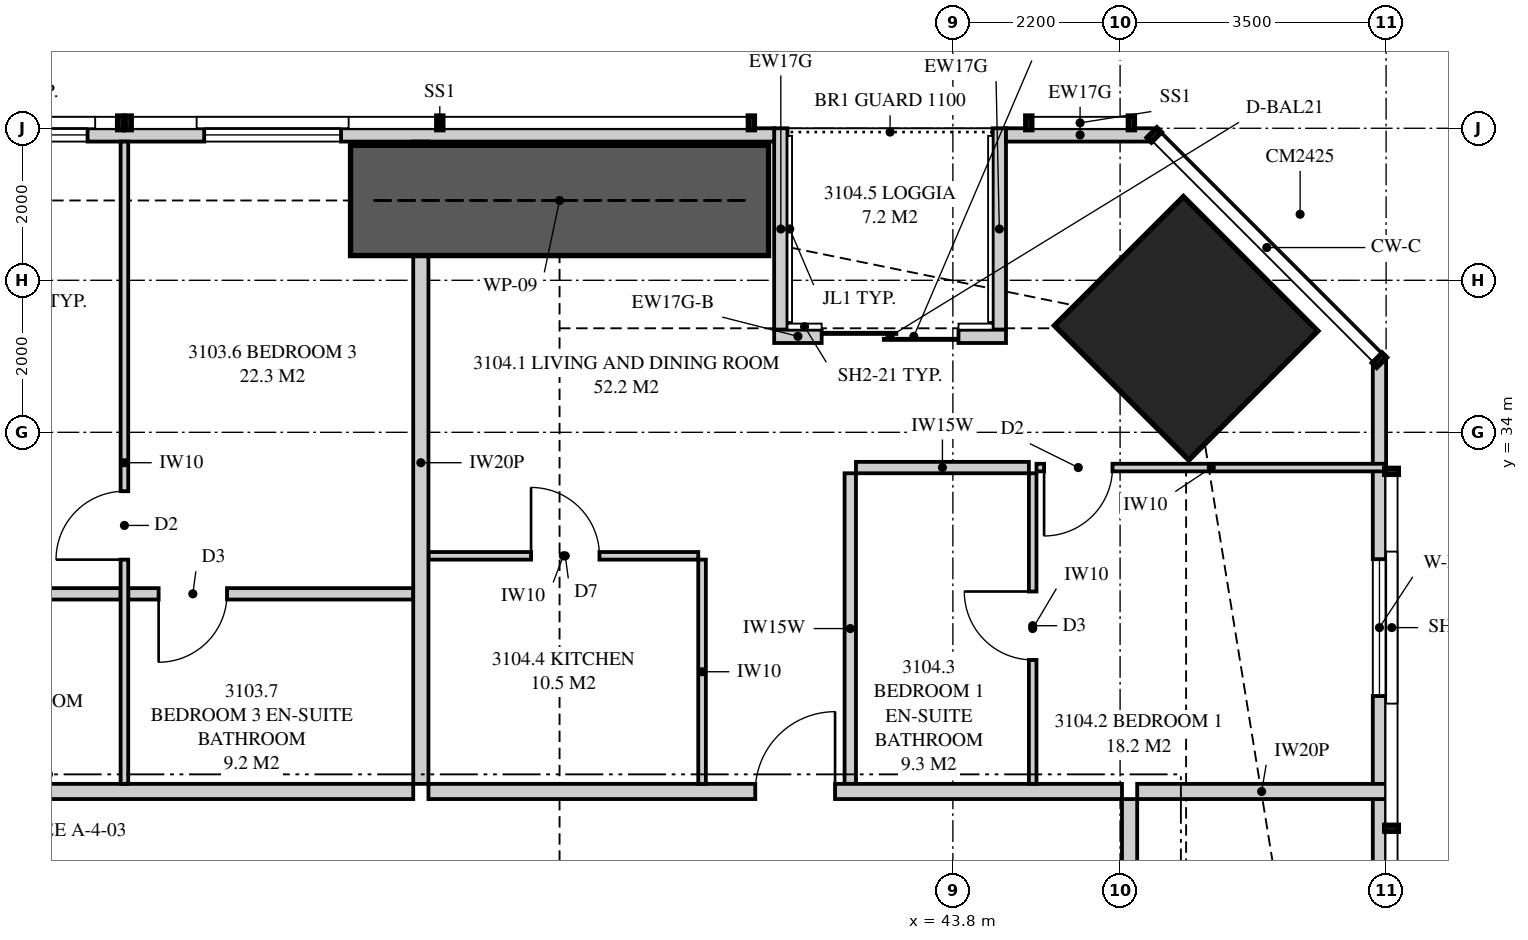
"""IFC4 building model, lengths in metres.
Left out: names, types, materials, properties, quantities, classifications, styles, units other than length and angle.
Written with IfcOpenShell. Run it as: python <this file> out.ifc"""

import sys

from ifc_helpers import new_model, si_unit, direction, frame, frame_2d, origin, origin_2d, place, context, subcontext, project, spatial, polyline, rectangle, outline, extrude, element, fill, save


model = new_model("IFC4")
c1 = context("Model", 3, precision=1e-05, world=origin(), true_north=direction((0.0, 1.0)))
c2 = subcontext(c1, "Body", "Model", "MODEL_VIEW")
j1 = project(units=[si_unit("LENGTHUNIT", "METRE"), si_unit("PLANEANGLEUNIT", "RADIAN")], contexts=[c1])
p1 = place(None, origin())
s1 = spatial("IfcSite", under=j1, at=p1, CompositionType="ELEMENT")
p2 = place(p1, origin())
s2 = spatial("IfcBuilding", under=s1, at=p2, CompositionType="ELEMENT")
p3 = place(p2, frame((0.0, 0.0, 114.9)))
s3 = spatial("IfcBuildingStorey", under=s2, at=p3, CompositionType="ELEMENT", Elevation=114.9)
p4 = place(p3, frame((46.869, 35.369, 0.0), z_axis=(0.0, 0.0, 1.0), x_axis=(-0.707106781187, -0.707106781187, 0.0)))
e1 = element("IfcColumn", 1, at=p4, inside=s3, PredefinedType="COLUMN", context=c2, shape_type="SweptSolid", body=[
    extrude(rectangle(XDim=2.4, YDim=2.5, at=origin_2d()), origin(), (0.0, 0.0, 1.0), 3.35),
])
p5 = place(p3, frame((49.413, 3.051, 0.0), z_axis=(0.0, 0.0, 1.0), x_axis=(0.0, 1.0, 0.0)))
e2 = element("IfcWall", 2, at=p5, inside=s3, PredefinedType="SOLIDWALL", context=c2, shape_type="SweptSolid", body=[
    extrude(outline(polyline([(0.0, 0.0), (31.897, 0.0), (31.897, 3.11), (22.167, 3.11), (22.167, 2.15), (22.074, 2.15), (22.074, 3.11), (21.949, 3.11), (21.949, 2.15), (9.949, 2.15), (9.949, 3.11), (9.823, 3.11), (9.823, 2.15), (9.73, 2.15), (9.73, 3.11), (0.0, 3.11), (0.0, 0.0)])), frame((0.0, 0.087, 0.0), z_axis=(0.0, -1.0, 0.0), x_axis=(1.0, 0.0, 0.0)), (0.0, 0.0, 1.0), 0.175),
])
p6 = place(p5, frame((2.118, 0.0, 0.4)))
e3 = element("IfcOpeningElement", 3, at=p6, cuts=e2, PredefinedType="OPENING", context=c2, shape_type="SweptSolid", body=[
    extrude(rectangle(XDim=1.8, YDim=1.7, at=frame_2d((0.9, 0.85))), frame((0.0, 0.097, 0.0), z_axis=(0.0, -1.0, 0.0), x_axis=(1.0, 0.0, 0.0)), (0.0, 0.0, 1.0), 0.195),
])
p7 = place(p5, frame((14.849, 0.0, 0.4)))
e4 = element("IfcOpeningElement", 4, at=p7, cuts=e2, PredefinedType="OPENING", context=c2, shape_type="SweptSolid", body=[
    extrude(rectangle(XDim=1.2, YDim=1.7, at=frame_2d((0.6, 0.85))), frame((0.0, 0.097, 0.0), z_axis=(0.0, -1.0, 0.0), x_axis=(1.0, 0.0, 0.0)), (0.0, 0.0, 1.0), 0.195),
])
p8 = place(p5, frame((27.479, 0.0, 0.4)))
e5 = element("IfcOpeningElement", 5, at=p8, cuts=e2, PredefinedType="OPENING", context=c2, shape_type="SweptSolid", body=[
    extrude(rectangle(XDim=1.8, YDim=1.7, at=frame_2d((0.9, 0.85))), frame((0.0, 0.097, 0.0), z_axis=(0.0, -1.0, 0.0), x_axis=(1.0, 0.0, 0.0)), (0.0, 0.0, 1.0), 0.195),
])
p9 = place(p3, frame((46.449, 37.913, 0.0), z_axis=(0.0, 0.0, 1.0), x_axis=(-1.0, 0.0, 0.0)))
e6 = element("IfcWall", 6, at=p9, inside=s3, PredefinedType="SOLIDWALL", context=c2, shape_type="SweptSolid", body=[
    extrude(rectangle(XDim=1.95, YDim=0.175, at=frame_2d((0.975, 0.0))), origin(), (0.0, 0.0, 1.0), 3.11),
])
p10 = place(p3, frame((41.449, 37.913, 0.0), z_axis=(0.0, 0.0, 1.0), x_axis=(-1.0, 0.0, 0.0)))
e7 = element("IfcWall", 7, at=p10, inside=s3, PredefinedType="SOLIDWALL", context=c2, shape_type="SweptSolid", body=[
    extrude(outline(polyline([(0.0, 0.0), (27.374, 0.0), (27.374, 3.11), (24.777, 3.11), (24.777, 2.15), (24.732, 2.15), (24.732, 3.11), (24.574, 3.11), (24.574, 2.15), (2.824, 2.15), (2.824, 3.11), (2.666, 3.11), (2.666, 2.15), (2.62, 2.15), (2.62, 3.11), (0.0, 3.11), (0.0, 0.0)])), frame((0.0, 0.087, 0.0), z_axis=(0.0, -1.0, 0.0), x_axis=(1.0, 0.0, 0.0)), (0.0, 0.0, 1.0), 0.175),
])
p11 = place(p10, frame((5.699, 0.0, 0.4)))
e8 = element("IfcOpeningElement", 8, at=p11, cuts=e7, PredefinedType="OPENING", context=c2, shape_type="SweptSolid", body=[
    extrude(rectangle(XDim=1.8, YDim=1.7, at=frame_2d((0.9, 0.85))), frame((0.0, 0.097, 0.0), z_axis=(0.0, -1.0, 0.0), x_axis=(1.0, 0.0, 0.0)), (0.0, 0.0, 1.0), 0.195),
])
p12 = place(p10, frame((9.034, 0.0, 0.4)))
e9 = element("IfcOpeningElement", 9, at=p12, cuts=e7, PredefinedType="OPENING", context=c2, shape_type="SweptSolid", body=[
    extrude(rectangle(XDim=1.8, YDim=1.7, at=frame_2d((0.9, 0.85))), frame((0.0, 0.097, 0.0), z_axis=(0.0, -1.0, 0.0), x_axis=(1.0, 0.0, 0.0)), (0.0, 0.0, 1.0), 0.195),
])
p13 = place(p10, frame((16.558, 0.0, 0.4)))
e10 = element("IfcOpeningElement", 10, at=p13, cuts=e7, PredefinedType="OPENING", context=c2, shape_type="SweptSolid", body=[
    extrude(rectangle(XDim=1.8, YDim=1.7, at=frame_2d((0.9, 0.85))), frame((0.0, 0.097, 0.0), z_axis=(0.0, -1.0, 0.0), x_axis=(1.0, 0.0, 0.0)), (0.0, 0.0, 1.0), 0.195),
])
p14 = place(p10, frame((19.724, 0.0, 0.4)))
e11 = element("IfcOpeningElement", 11, at=p14, cuts=e7, PredefinedType="OPENING", context=c2, shape_type="SweptSolid", body=[
    extrude(rectangle(XDim=1.8, YDim=1.7, at=frame_2d((0.9, 0.85))), frame((0.0, 0.097, 0.0), z_axis=(0.0, -1.0, 0.0), x_axis=(1.0, 0.0, 0.0)), (0.0, 0.0, 1.0), 0.195),
])
p15 = place(p3, frame((44.499, 35.262, 0.0), z_axis=(0.0, 0.0, 1.0), x_axis=(-1.0, 0.0, 0.0)))
e12 = element("IfcWall", 12, at=p15, inside=s3, PredefinedType="SOLIDWALL", context=c2, shape_type="SweptSolid", body=[
    extrude(rectangle(XDim=2.425, YDim=0.175, at=frame_2d((1.212, 0.0))), origin(), (0.0, 0.0, 1.0), 2.15),
])
p16 = place(p15, frame((0.625, 0.0, 0.0)))
e13 = element("IfcOpeningElement", 13, at=p16, cuts=e12, PredefinedType="OPENING", context=c2, shape_type="SweptSolid", body=[
    extrude(rectangle(XDim=1.8, YDim=2.1, at=frame_2d((0.9, 1.05))), frame((0.0, 0.097, 0.0), z_axis=(0.0, -1.0, 0.0), x_axis=(1.0, 0.0, 0.0)), (0.0, 0.0, 1.0), 0.195),
])
p17 = place(p3, frame((42.074, 35.262, 0.0), z_axis=(0.0, 0.0, 1.0), x_axis=(-1.0, 0.0, 0.0)))
e14 = element("IfcWall", 14, at=p17, inside=s3, PredefinedType="SOLIDWALL", context=c2, shape_type="SweptSolid", body=[
    extrude(rectangle(XDim=0.625, YDim=0.175, at=frame_2d((0.312, 0.0))), origin(), (0.0, 0.0, 1.0), 2.51),
])
p18 = place(p3, frame((44.411, 38.0, 0.0), z_axis=(0.0, 0.0, 1.0), x_axis=(0.0, -1.0, 0.0)))
e15 = element("IfcWall", 15, at=p18, inside=s3, PredefinedType="SOLIDWALL", context=c2, shape_type="SweptSolid", body=[
    extrude(outline(polyline([(0.0, 0.0), (2.65, 0.0), (2.65, 2.15), (1.296, 2.15), (1.296, 3.11), (0.0, 3.11), (0.0, 0.0)])), frame((0.0, 0.087, 0.0), z_axis=(0.0, -1.0, 0.0), x_axis=(1.0, 0.0, 0.0)), (0.0, 0.0, 1.0), 0.175),
])
p19 = place(p3, frame((41.536, 38.0, 0.0), z_axis=(0.0, 0.0, 1.0), x_axis=(0.0, -1.0, 0.0)))
e16 = element("IfcWall", 16, at=p19, inside=s3, PredefinedType="SOLIDWALL", context=c2, shape_type="SweptSolid", body=[
    extrude(outline(polyline([(0.0, 0.0), (2.65, 0.0), (2.65, 2.51), (2.378, 2.51), (2.378, 2.15), (0.709, 2.15), (0.709, 3.11), (0.0, 3.11), (0.0, 0.0)])), frame((0.0, 0.087, 0.0), z_axis=(0.0, -1.0, 0.0), x_axis=(1.0, 0.0, 0.0)), (0.0, 0.0, 1.0), 0.175),
])
p20 = place(p3, frame((36.8, 37.825, 0.0), z_axis=(0.0, 0.0, 1.0), x_axis=(0.0, -1.0, 0.0)))
e17 = element("IfcWall", 17, at=p20, inside=s3, PredefinedType="PARTITIONING", context=c2, shape_type="SweptSolid", body=[
    extrude(outline(polyline([(0.529, 2.15), (0.0, 2.15), (0.0, 0.0), (0.529, 0.0), (0.529, 0.257), (1.021, 0.257), (1.021, 0.0), (8.45, 0.0), (8.45, 3.11), (1.685, 3.11), (1.685, 2.15), (1.021, 2.15), (1.021, 1.894), (0.529, 1.894), (0.529, 2.15)])), frame((0.0, 0.1, 0.0), z_axis=(0.0, -1.0, 0.0), x_axis=(1.0, 0.0, 0.0)), (0.0, 0.0, 1.0), 0.2),
])
p21 = place(p3, frame((17.775, 29.275, 0.0), z_axis=(0.0, 0.0, 1.0), x_axis=(1.0, 0.0, 0.0)))
e18 = element("IfcWall", 18, at=p21, inside=s3, PredefinedType="PARTITIONING", context=c2, shape_type="SweptSolid", body=[
    extrude(outline(polyline([(0.0, 0.0), (18.925, 0.0), (18.925, 3.11), (10.312, 3.11), (10.312, 2.541), (9.638, 2.541), (9.638, 3.11), (0.0, 3.11), (0.0, 0.0)])), frame((0.0, 0.1, 0.0), z_axis=(0.0, -1.0, 0.0), x_axis=(1.0, 0.0, 0.0)), (0.0, 0.0, 1.0), 0.2),
])
p22 = place(p21, frame((3.125, 0.0, 0.0)))
e19 = element("IfcOpeningElement", 19, at=p22, cuts=e18, PredefinedType="OPENING", context=c2, shape_type="SweptSolid", body=[
    extrude(rectangle(XDim=1.05, YDim=2.2, at=frame_2d((0.525, 1.1))), frame((0.0, 0.11, 0.0), z_axis=(0.0, -1.0, 0.0), x_axis=(1.0, 0.0, 0.0)), (0.0, 0.0, 1.0), 0.22),
])
p23 = place(p3, frame((32.9, 37.825, 0.0), z_axis=(0.0, 0.0, 1.0), x_axis=(0.0, -1.0, 0.0)))
e20 = element("IfcWall", 20, at=p23, inside=s3, PredefinedType="PARTITIONING", context=c2, shape_type="SweptSolid", body=[
    extrude(outline(polyline([(0.0, 0.0), (8.45, 0.0), (8.45, 3.11), (1.635, 3.11), (1.635, 2.15), (0.0, 2.15), (0.0, 3.11), (0.0, 0.0)])), frame((0.0, 0.05, 0.0), z_axis=(0.0, -1.0, 0.0), x_axis=(1.0, 0.0, 0.0)), (0.0, 0.0, 1.0), 0.1),
])
p24 = place(p23, frame((4.6, 0.0, 0.0)))
e21 = element("IfcOpeningElement", 21, at=p24, cuts=e20, PredefinedType="OPENING", context=c2, shape_type="SweptSolid", body=[
    extrude(rectangle(XDim=0.9, YDim=2.1, at=frame_2d((0.45, 1.05))), frame((0.0, 0.06, 0.0), z_axis=(0.0, -1.0, 0.0), x_axis=(1.0, 0.0, 0.0)), (0.0, 0.0, 1.0), 0.12),
])
p25 = place(p3, frame((26.95, 31.875, 0.0), z_axis=(0.0, 0.0, 1.0), x_axis=(1.0, 0.0, 0.0)))
e22 = element("IfcWall", 22, at=p25, inside=s3, PredefinedType="PLUMBINGWALL", context=c2, shape_type="SweptSolid", body=[
    extrude(outline(polyline([(0.0, 0.0), (5.9, 0.0), (5.9, 3.11), (1.112, 3.11), (1.112, 2.541), (0.488, 2.541), (0.488, 3.11), (0.0, 3.11), (0.0, 0.0)])), frame((0.0, 0.075, 0.0), z_axis=(0.0, -1.0, 0.0), x_axis=(1.0, 0.0, 0.0)), (0.0, 0.0, 1.0), 0.15),
])
p26 = place(p25, frame((0.4, 0.0, 0.0)))
e23 = element("IfcOpeningElement", 23, at=p26, cuts=e22, PredefinedType="OPENING", context=c2, shape_type="SweptSolid", body=[
    extrude(rectangle(XDim=0.9, YDim=2.1, at=frame_2d((0.45, 1.05))), frame((0.0, 0.085, 0.0), z_axis=(0.0, -1.0, 0.0), x_axis=(1.0, 0.0, 0.0)), (0.0, 0.0, 1.0), 0.17),
])
p27 = place(p3, frame((32.95, 31.875, 0.0), z_axis=(0.0, 0.0, 1.0), x_axis=(1.0, 0.0, 0.0)))
e24 = element("IfcWall", 24, at=p27, inside=s3, PredefinedType="PLUMBINGWALL", context=c2, shape_type="SweptSolid", body=[
    extrude(rectangle(XDim=3.75, YDim=0.15, at=frame_2d((1.875, 0.0))), origin(), (0.0, 0.0, 1.0), 3.11),
])
p28 = place(p27, frame((0.4, 0.0, 0.0)))
e25 = element("IfcOpeningElement", 25, at=p28, cuts=e24, PredefinedType="OPENING", context=c2, shape_type="SweptSolid", body=[
    extrude(rectangle(XDim=0.9, YDim=2.1, at=frame_2d((0.45, 1.05))), frame((0.0, 0.085, 0.0), z_axis=(0.0, -1.0, 0.0), x_axis=(1.0, 0.0, 0.0)), (0.0, 0.0, 1.0), 0.17),
])
p29 = place(p3, frame((36.9, 29.275, 0.0), z_axis=(0.0, 0.0, 1.0), x_axis=(1.0, 0.0, 0.0)))
e26 = element("IfcWall", 26, at=p29, inside=s3, PredefinedType="PARTITIONING", context=c2, shape_type="SweptSolid", body=[
    extrude(outline(polyline([(0.0, 0.0), (9.125, 0.0), (9.125, 3.11), (2.062, 3.11), (2.062, 2.541), (1.388, 2.541), (1.388, 3.11), (0.0, 3.11), (0.0, 0.0)])), frame((0.0, 0.1, 0.0), z_axis=(0.0, -1.0, 0.0), x_axis=(1.0, 0.0, 0.0)), (0.0, 0.0, 1.0), 0.2),
])
p30 = place(p29, frame((4.3, 0.0, 0.0)))
e27 = element("IfcOpeningElement", 27, at=p30, cuts=e26, PredefinedType="OPENING", context=c2, shape_type="SweptSolid", body=[
    extrude(rectangle(XDim=1.05, YDim=2.2, at=frame_2d((0.525, 1.1))), frame((0.0, 0.11, 0.0), z_axis=(0.0, -1.0, 0.0), x_axis=(1.0, 0.0, 0.0)), (0.0, 0.0, 1.0), 0.22),
])
p31 = place(p3, frame((44.85, 33.461, 0.0), z_axis=(0.0, 0.0, 1.0), x_axis=(0.0, -1.0, 0.0)))
e28 = element("IfcWall", 28, at=p31, inside=s3, PredefinedType="PARTITIONING", context=c2, shape_type="SweptSolid", body=[
    extrude(rectangle(XDim=4.086, YDim=0.1, at=frame_2d((2.043, 0.0))), origin(), (0.0, 0.0, 1.0), 3.11),
])
p32 = place(p31, frame((1.556, 0.0, 0.0)))
e29 = element("IfcOpeningElement", 29, at=p32, cuts=e28, PredefinedType="OPENING", context=c2, shape_type="SweptSolid", body=[
    extrude(rectangle(XDim=0.9, YDim=2.1, at=frame_2d((0.45, 1.05))), frame((0.0, 0.06, 0.0), z_axis=(0.0, -1.0, 0.0), x_axis=(1.0, 0.0, 0.0)), (0.0, 0.0, 1.0), 0.12),
])
p33 = place(p3, frame((44.9, 33.536, 0.0), z_axis=(0.0, 0.0, 1.0), x_axis=(1.0, 0.0, 0.0)))
e30 = element("IfcWall", 30, at=p33, inside=s3, PredefinedType="PARTITIONING", context=c2, shape_type="SweptSolid", body=[
    extrude(outline(polyline([(0.0, 0.0), (4.6, 0.0), (4.6, 3.11), (3.137, 3.11), (3.137, 2.15), (1.395, 2.15), (1.395, 3.11), (0.0, 3.11), (0.0, 0.0)])), frame((0.0, 0.05, 0.0), z_axis=(0.0, -1.0, 0.0), x_axis=(1.0, 0.0, 0.0)), (0.0, 0.0, 1.0), 0.1),
])
p34 = place(p33, frame((0.1, 0.0, 0.0)))
e31 = element("IfcOpeningElement", 31, at=p34, cuts=e30, PredefinedType="OPENING", context=c2, shape_type="SweptSolid", body=[
    extrude(rectangle(XDim=0.9, YDim=2.1, at=frame_2d((0.45, 1.05))), frame((0.0, 0.06, 0.0), z_axis=(0.0, -1.0, 0.0), x_axis=(1.0, 0.0, 0.0)), (0.0, 0.0, 1.0), 0.12),
])
p35 = place(p3, frame((42.525, 33.536, 0.0), z_axis=(0.0, 0.0, 1.0), x_axis=(1.0, 0.0, 0.0)))
e32 = element("IfcWall", 32, at=p35, inside=s3, PredefinedType="PLUMBINGWALL", context=c2, shape_type="SweptSolid", body=[
    extrude(rectangle(XDim=2.275, YDim=0.15, at=frame_2d((1.138, 0.0))), origin(), (0.0, 0.0, 1.0), 3.11),
])
p36 = place(p3, frame((42.45, 33.461, 0.0), z_axis=(0.0, 0.0, 1.0), x_axis=(0.0, -1.0, 0.0)))
e33 = element("IfcWall", 33, at=p36, inside=s3, PredefinedType="PLUMBINGWALL", context=c2, shape_type="SweptSolid", body=[
    extrude(rectangle(XDim=4.086, YDim=0.15, at=frame_2d((2.043, 0.0))), origin(), (0.0, 0.0, 1.0), 3.11),
])
p37 = place(p3, frame((36.9, 32.375, 0.0), z_axis=(0.0, 0.0, 1.0), x_axis=(1.0, 0.0, 0.0)))
e34 = element("IfcWall", 34, at=p37, inside=s3, PredefinedType="PARTITIONING", context=c2, shape_type="SweptSolid", body=[
    extrude(outline(polyline([(0.0, 0.0), (3.55, 0.0), (3.55, 3.11), (2.012, 3.11), (2.012, 2.541), (1.438, 2.541), (1.438, 3.11), (0.0, 3.11), (0.0, 0.0)])), frame((0.0, 0.05, 0.0), z_axis=(0.0, -1.0, 0.0), x_axis=(1.0, 0.0, 0.0)), (0.0, 0.0, 1.0), 0.1),
])
p38 = place(p37, frame((1.35, 0.0, 0.0)))
e35 = element("IfcOpeningElement", 35, at=p38, cuts=e34, PredefinedType="OPENING", context=c2, shape_type="SweptSolid", body=[
    extrude(rectangle(XDim=0.9, YDim=2.1, at=frame_2d((0.45, 1.05))), frame((0.0, 0.06, 0.0), z_axis=(0.0, -1.0, 0.0), x_axis=(1.0, 0.0, 0.0)), (0.0, 0.0, 1.0), 0.12),
])
p39 = place(p3, frame((40.5, 32.325, 0.0), z_axis=(0.0, 0.0, 1.0), x_axis=(0.0, -1.0, 0.0)))
e36 = element("IfcWall", 36, at=p39, inside=s3, PredefinedType="PARTITIONING", context=c2, shape_type="SweptSolid", body=[
    extrude(rectangle(XDim=2.95, YDim=0.1, at=frame_2d((1.475, 0.0))), origin(), (0.0, 0.0, 1.0), 3.11),
])
p40 = place(p3, frame((46.225, 29.275, 0.0), z_axis=(0.0, 0.0, 1.0), x_axis=(1.0, 0.0, 0.0)))
e37 = element("IfcWall", 37, at=p40, inside=s3, PredefinedType="PARTITIONING", context=c2, shape_type="SweptSolid", body=[
    extrude(outline(polyline([(0.0, 0.0), (3.275, 0.0), (3.275, 3.11), (2.554, 3.11), (2.554, 2.15), (0.805, 2.15), (0.805, 2.541), (0.306, 2.541), (0.306, 3.11), (0.0, 3.11), (0.0, 0.0)])), frame((0.0, 0.1, 0.0), z_axis=(0.0, -1.0, 0.0), x_axis=(1.0, 0.0, 0.0)), (0.0, 0.0, 1.0), 0.2),
])
p41 = place(p3, frame((46.125, 20.7, 0.0), z_axis=(0.0, 0.0, 1.0), x_axis=(0.0, 1.0, 0.0)))
e38 = element("IfcWall", 38, at=p41, inside=s3, PredefinedType="PARTITIONING", context=c2, shape_type="SweptSolid", body=[
    extrude(outline(polyline([(0.0, 0.0), (8.475, 0.0), (8.475, 3.11), (4.637, 3.11), (4.637, 2.541), (3.963, 2.541), (3.963, 3.11), (0.0, 3.11), (0.0, 0.0)])), frame((0.0, 0.1, 0.0), z_axis=(0.0, -1.0, 0.0), x_axis=(1.0, 0.0, 0.0)), (0.0, 0.0, 1.0), 0.2),
])
p42 = place(p41, frame((6.625, 0.0, 0.0)))
e39 = element("IfcOpeningElement", 39, at=p42, cuts=e38, PredefinedType="OPENING", context=c2, shape_type="SweptSolid", body=[
    extrude(rectangle(XDim=1.0, YDim=2.1, at=frame_2d((0.5, 1.05))), frame((0.0, 0.11, 0.0), z_axis=(0.0, -1.0, 0.0), x_axis=(1.0, 0.0, 0.0)), (0.0, 0.0, 1.0), 0.22),
])
p43 = place(p3, frame((35.875, 37.05, 0.0), z_axis=(0.0, 0.0, 1.0), x_axis=(1.0, 0.0, 0.0)))
e40 = element("IfcWall", 40, at=p43, inside=s3, PredefinedType="SHEAR", context=c2, shape_type="SweptSolid", body=[
    extrude(rectangle(XDim=5.5, YDim=1.45, at=frame_2d((2.75, 0.0))), origin(), (0.0, 0.0, 1.0), 3.35),
])
p44 = place(p8, origin())
e41 = element("IfcWindow", 41, at=p44, inside=s3, PartitioningType="SINGLE_PANEL", PredefinedType="WINDOW", context=c2, shape_type="SweptSolid", body=[
    extrude(rectangle(XDim=1.8, YDim=1.7, at=frame_2d((0.9, 0.85))), frame((0.0, 0.03, 0.0), z_axis=(0.0, -1.0, 0.0), x_axis=(1.0, 0.0, 0.0)), (0.0, 0.0, 1.0), 0.06),
])
fill(e5, e41)
p45 = place(p16, origin())
e42 = element("IfcDoor", 42, at=p45, inside=s3, OperationType="SLIDING_TO_LEFT", PredefinedType="DOOR", context=c2, shape_type="SweptSolid", body=[
    extrude(rectangle(XDim=1.8, YDim=2.1, at=frame_2d((0.9, 1.05))), frame((0.0, 0.025, 0.0), z_axis=(0.0, -1.0, 0.0), x_axis=(1.0, 0.0, 0.0)), (0.0, 0.0, 1.0), 0.05),
])
fill(e13, e42)
p46 = place(p11, origin())
e43 = element("IfcWindow", 43, at=p46, inside=s3, PartitioningType="SINGLE_PANEL", PredefinedType="WINDOW", context=c2, shape_type="SweptSolid", body=[
    extrude(rectangle(XDim=1.8, YDim=1.7, at=frame_2d((0.9, 0.85))), frame((0.0, 0.03, 0.0), z_axis=(0.0, -1.0, 0.0), x_axis=(1.0, 0.0, 0.0)), (0.0, 0.0, 1.0), 0.06),
])
fill(e8, e43)
p47 = place(p12, origin())
e44 = element("IfcWindow", 44, at=p47, inside=s3, PartitioningType="SINGLE_PANEL", PredefinedType="WINDOW", context=c2, shape_type="SweptSolid", body=[
    extrude(rectangle(XDim=1.8, YDim=1.7, at=frame_2d((0.9, 0.85))), frame((0.0, 0.03, 0.0), z_axis=(0.0, -1.0, 0.0), x_axis=(1.0, 0.0, 0.0)), (0.0, 0.0, 1.0), 0.06),
])
fill(e9, e44)
p48 = place(p24, frame((0.9, 0.0, 0.0), z_axis=(0.0, 0.0, 1.0), x_axis=(-1.0, 0.0, 0.0)))
e45 = element("IfcDoor", 45, at=p48, inside=s3, OperationType="SINGLE_SWING_LEFT", PredefinedType="DOOR", context=c2, shape_type="SweptSolid", body=[
    extrude(rectangle(XDim=0.9, YDim=2.1, at=frame_2d((0.45, 1.05))), frame((0.0, 0.025, 0.0), z_axis=(0.0, -1.0, 0.0), x_axis=(1.0, 0.0, 0.0)), (0.0, 0.0, 1.0), 0.05),
])
fill(e21, e45)
p49 = place(p28, frame((0.9, 0.0, 0.0), z_axis=(0.0, 0.0, 1.0), x_axis=(-1.0, 0.0, 0.0)))
e46 = element("IfcDoor", 46, at=p49, inside=s3, OperationType="SINGLE_SWING_RIGHT", PredefinedType="DOOR", context=c2, shape_type="SweptSolid", body=[
    extrude(rectangle(XDim=0.9, YDim=2.1, at=frame_2d((0.45, 1.05))), frame((0.0, 0.025, 0.0), z_axis=(0.0, -1.0, 0.0), x_axis=(1.0, 0.0, 0.0)), (0.0, 0.0, 1.0), 0.05),
])
fill(e25, e46)
p50 = place(p30, origin())
e47 = element("IfcDoor", 47, at=p50, inside=s3, OperationType="SINGLE_SWING_RIGHT", PredefinedType="DOOR", context=c2, shape_type="SweptSolid", body=[
    extrude(rectangle(XDim=1.05, YDim=2.2, at=frame_2d((0.525, 1.1))), frame((0.0, 0.025, 0.0), z_axis=(0.0, -1.0, 0.0), x_axis=(1.0, 0.0, 0.0)), (0.0, 0.0, 1.0), 0.05),
])
fill(e27, e47)
p51 = place(p34, frame((0.9, 0.0, 0.0), z_axis=(0.0, 0.0, 1.0), x_axis=(-1.0, 0.0, 0.0)))
e48 = element("IfcDoor", 48, at=p51, inside=s3, OperationType="SINGLE_SWING_RIGHT", PredefinedType="DOOR", context=c2, shape_type="SweptSolid", body=[
    extrude(rectangle(XDim=0.9, YDim=2.1, at=frame_2d((0.45, 1.05))), frame((0.0, 0.025, 0.0), z_axis=(0.0, -1.0, 0.0), x_axis=(1.0, 0.0, 0.0)), (0.0, 0.0, 1.0), 0.05),
])
fill(e31, e48)
p52 = place(p32, frame((0.9, 0.0, 0.0), z_axis=(0.0, 0.0, 1.0), x_axis=(-1.0, 0.0, 0.0)))
e49 = element("IfcDoor", 49, at=p52, inside=s3, OperationType="SINGLE_SWING_RIGHT", PredefinedType="DOOR", context=c2, shape_type="SweptSolid", body=[
    extrude(rectangle(XDim=0.9, YDim=2.1, at=frame_2d((0.45, 1.05))), frame((0.0, 0.025, 0.0), z_axis=(0.0, -1.0, 0.0), x_axis=(1.0, 0.0, 0.0)), (0.0, 0.0, 1.0), 0.05),
])
fill(e29, e49)
p53 = place(p38, origin())
e50 = element("IfcDoor", 50, at=p53, inside=s3, OperationType="SINGLE_SWING_LEFT", PredefinedType="DOOR", context=c2, shape_type="SweptSolid", body=[
    extrude(rectangle(XDim=0.9, YDim=2.1, at=frame_2d((0.45, 1.05))), frame((0.0, 0.025, 0.0), z_axis=(0.0, -1.0, 0.0), x_axis=(1.0, 0.0, 0.0)), (0.0, 0.0, 1.0), 0.05),
])
fill(e35, e50)
save(model, sys.argv[1])
